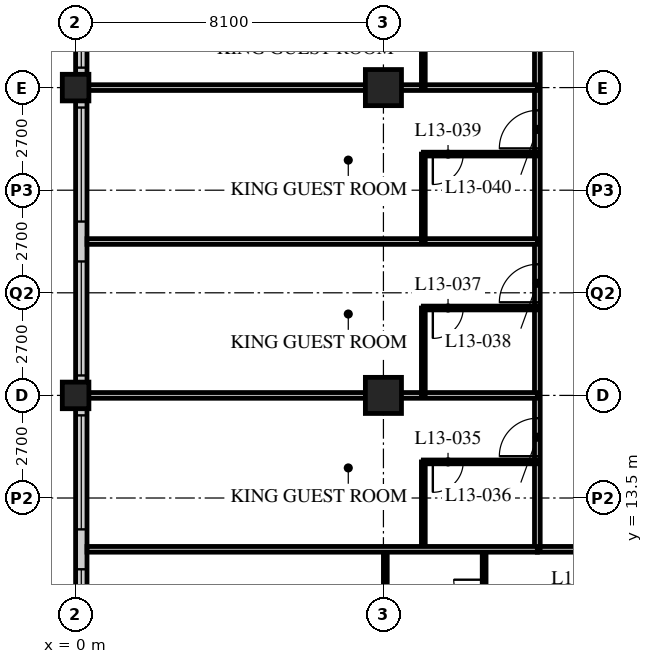
"""IFC4 building model, lengths in metres.
Left out: names, types, materials, properties, quantities, classifications, styles, units other than length and angle.
Written with IfcOpenShell. Run it as: python <this file> out.ifc"""

import sys

from ifc_helpers import new_model, si_unit, direction, frame, frame_2d, origin, origin_2d, place, context, subcontext, project, spatial, rectangle, hollow_rectangle, extrude, element, fill, save


model = new_model("IFC4")
c1 = context("Model", 3, precision=1e-05, world=origin(), true_north=direction((0.0, 1.0)))
c2 = subcontext(c1, "Body", "Model", "MODEL_VIEW")
j1 = project(units=[si_unit("LENGTHUNIT", "METRE"), si_unit("PLANEANGLEUNIT", "RADIAN")], contexts=[c1])
p1 = place(None, origin())
s1 = spatial("IfcSite", under=j1, at=p1, CompositionType="ELEMENT")
p2 = place(p1, origin())
s2 = spatial("IfcBuilding", under=s1, at=p2, CompositionType="ELEMENT")
p3 = place(p2, frame((0.0, 0.0, 56.8)))
s3 = spatial("IfcBuildingStorey", under=s2, at=p3, CompositionType="ELEMENT", Elevation=56.8)
for number, where, z_axis, x_axis in (
    (1, (0.0, 16.2, 0.0), (0.0, 0.0, 1.0), (1.0, 0.0, 0.0)),
    (2, (0.0, 24.3, 0.0), (0.0, 0.0, 1.0), (1.0, 0.0, 0.0)),
):
    element("IfcColumn", number, at=place(p3, frame(where, z_axis=z_axis, x_axis=x_axis)), inside=s3, PredefinedType="COLUMN", context=c2, shape_type="SweptSolid", body=[
        extrude(hollow_rectangle(XDim=0.7, YDim=0.7, WallThickness=0.06, at=origin_2d()), origin(), (0.0, 0.0, 1.0), 3.4),
    ])
for number, where, z_axis, x_axis in (
    (3, (8.1, 16.2, 0.0), (0.0, 0.0, 1.0), (1.0, 0.0, 0.0)),
    (4, (8.1, 24.3, 0.0), (0.0, 0.0, 1.0), (1.0, 0.0, 0.0)),
):
    element("IfcColumn", number, at=place(p3, frame(where, z_axis=z_axis, x_axis=x_axis)), inside=s3, PredefinedType="COLUMN", context=c2, shape_type="SweptSolid", body=[
        extrude(hollow_rectangle(XDim=0.95, YDim=0.95, WallThickness=0.095, at=origin_2d()), origin(), (0.0, 0.0, 1.0), 3.4),
    ])
p4 = place(p3, frame((0.15, 40.2, 0.0), z_axis=(0.0, 0.0, 1.0), x_axis=(0.0, -1.0, 0.0)))
e5 = element("IfcWall", 5, at=p4, inside=s3, PredefinedType="SOLIDWALL", context=c2, shape_type="SweptSolid", body=[
    extrude(rectangle(XDim=32.1, YDim=0.3, at=frame_2d((16.05, 0.0))), origin(), (0.0, 0.0, 1.0), 3.19),
])
p5 = place(p4, frame((0.225, 0.0, 0.9)))
e6 = element("IfcOpeningElement", 6, at=p5, cuts=e5, PredefinedType="OPENING", context=c2, shape_type="SweptSolid", body=[
    extrude(rectangle(XDim=3.0, YDim=2.0, at=frame_2d((1.5, 1.0))), frame((0.0, 0.16, 0.0), z_axis=(0.0, -1.0, 0.0), x_axis=(1.0, 0.0, 0.0)), (0.0, 0.0, 1.0), 0.32),
])
p6 = place(p4, frame((4.275, 0.0, 0.9)))
e7 = element("IfcOpeningElement", 7, at=p6, cuts=e5, PredefinedType="OPENING", context=c2, shape_type="SweptSolid", body=[
    extrude(rectangle(XDim=3.0, YDim=2.0, at=frame_2d((1.5, 1.0))), frame((0.0, 0.16, 0.0), z_axis=(0.0, -1.0, 0.0), x_axis=(1.0, 0.0, 0.0)), (0.0, 0.0, 1.0), 0.32),
])
p7 = place(p4, frame((8.325, 0.0, 0.9)))
e8 = element("IfcOpeningElement", 8, at=p7, cuts=e5, PredefinedType="OPENING", context=c2, shape_type="SweptSolid", body=[
    extrude(rectangle(XDim=3.0, YDim=2.0, at=frame_2d((1.5, 1.0))), frame((0.0, 0.16, 0.0), z_axis=(0.0, -1.0, 0.0), x_axis=(1.0, 0.0, 0.0)), (0.0, 0.0, 1.0), 0.32),
])
p8 = place(p4, frame((12.375, 0.0, 0.9)))
e9 = element("IfcOpeningElement", 9, at=p8, cuts=e5, PredefinedType="OPENING", context=c2, shape_type="SweptSolid", body=[
    extrude(rectangle(XDim=3.0, YDim=2.0, at=frame_2d((1.5, 1.0))), frame((0.0, 0.16, 0.0), z_axis=(0.0, -1.0, 0.0), x_axis=(1.0, 0.0, 0.0)), (0.0, 0.0, 1.0), 0.32),
])
p9 = place(p4, frame((16.425, 0.0, 0.9)))
e10 = element("IfcOpeningElement", 10, at=p9, cuts=e5, PredefinedType="OPENING", context=c2, shape_type="SweptSolid", body=[
    extrude(rectangle(XDim=3.0, YDim=2.0, at=frame_2d((1.5, 1.0))), frame((0.0, 0.16, 0.0), z_axis=(0.0, -1.0, 0.0), x_axis=(1.0, 0.0, 0.0)), (0.0, 0.0, 1.0), 0.32),
])
p10 = place(p4, frame((20.475, 0.0, 0.9)))
e11 = element("IfcOpeningElement", 11, at=p10, cuts=e5, PredefinedType="OPENING", context=c2, shape_type="SweptSolid", body=[
    extrude(rectangle(XDim=3.0, YDim=2.0, at=frame_2d((1.5, 1.0))), frame((0.0, 0.16, 0.0), z_axis=(0.0, -1.0, 0.0), x_axis=(1.0, 0.0, 0.0)), (0.0, 0.0, 1.0), 0.32),
])
p11 = place(p4, frame((24.525, 0.0, 0.9)))
e12 = element("IfcOpeningElement", 12, at=p11, cuts=e5, PredefinedType="OPENING", context=c2, shape_type="SweptSolid", body=[
    extrude(rectangle(XDim=3.0, YDim=2.0, at=frame_2d((1.5, 1.0))), frame((0.0, 0.16, 0.0), z_axis=(0.0, -1.0, 0.0), x_axis=(1.0, 0.0, 0.0)), (0.0, 0.0, 1.0), 0.32),
])
p12 = place(p4, frame((28.575, 0.0, 0.9)))
e13 = element("IfcOpeningElement", 13, at=p12, cuts=e5, PredefinedType="OPENING", context=c2, shape_type="SweptSolid", body=[
    extrude(rectangle(XDim=3.0, YDim=2.0, at=frame_2d((1.5, 1.0))), frame((0.0, 0.16, 0.0), z_axis=(0.0, -1.0, 0.0), x_axis=(1.0, 0.0, 0.0)), (0.0, 0.0, 1.0), 0.32),
])
p13 = place(p3, frame((12.15, 12.15, 0.0), z_axis=(0.0, 0.0, 1.0), x_axis=(1.0, 0.0, 0.0)))
e14 = element("IfcWall", 14, at=p13, inside=s3, PredefinedType="PARTITIONING", context=c2, shape_type="SweptSolid", body=[
    extrude(rectangle(XDim=32.4, YDim=0.15, at=frame_2d((16.2, 0.0))), origin(), (0.0, 0.0, 1.0), 3.19),
])
p14 = place(p13, frame((6.5, 0.0, 0.0)))
e15 = element("IfcOpeningElement", 15, at=p14, cuts=e14, PredefinedType="OPENING", context=c2, shape_type="SweptSolid", body=[
    extrude(rectangle(XDim=1.0, YDim=2.1, at=frame_2d((0.5, 1.05))), frame((0.0, 0.085, 0.0), z_axis=(0.0, -1.0, 0.0), x_axis=(1.0, 0.0, 0.0)), (0.0, 0.0, 1.0), 0.17),
])
p15 = place(p13, frame((8.4, 0.0, 0.0)))
e16 = element("IfcOpeningElement", 16, at=p15, cuts=e14, PredefinedType="OPENING", context=c2, shape_type="SweptSolid", body=[
    extrude(rectangle(XDim=1.0, YDim=2.1, at=frame_2d((0.5, 1.05))), frame((0.0, 0.085, 0.0), z_axis=(0.0, -1.0, 0.0), x_axis=(1.0, 0.0, 0.0)), (0.0, 0.0, 1.0), 0.17),
])
p16 = place(p13, frame((14.6, 0.0, 0.0)))
e17 = element("IfcOpeningElement", 17, at=p16, cuts=e14, PredefinedType="OPENING", context=c2, shape_type="SweptSolid", body=[
    extrude(rectangle(XDim=1.0, YDim=2.1, at=frame_2d((0.5, 1.05))), frame((0.0, 0.085, 0.0), z_axis=(0.0, -1.0, 0.0), x_axis=(1.0, 0.0, 0.0)), (0.0, 0.0, 1.0), 0.17),
])
p17 = place(p13, frame((18.65, 0.0, 0.0)))
e18 = element("IfcOpeningElement", 18, at=p17, cuts=e14, PredefinedType="OPENING", context=c2, shape_type="SweptSolid", body=[
    extrude(rectangle(XDim=1.0, YDim=2.1, at=frame_2d((0.5, 1.05))), frame((0.0, 0.085, 0.0), z_axis=(0.0, -1.0, 0.0), x_axis=(1.0, 0.0, 0.0)), (0.0, 0.0, 1.0), 0.17),
])
p18 = place(p13, frame((20.55, 0.0, 0.0)))
e19 = element("IfcOpeningElement", 19, at=p18, cuts=e14, PredefinedType="OPENING", context=c2, shape_type="SweptSolid", body=[
    extrude(rectangle(XDim=1.0, YDim=2.1, at=frame_2d((0.5, 1.05))), frame((0.0, 0.085, 0.0), z_axis=(0.0, -1.0, 0.0), x_axis=(1.0, 0.0, 0.0)), (0.0, 0.0, 1.0), 0.17),
])
p19 = place(p13, frame((26.75, 0.0, 0.0)))
e20 = element("IfcOpeningElement", 20, at=p19, cuts=e14, PredefinedType="OPENING", context=c2, shape_type="SweptSolid", body=[
    extrude(rectangle(XDim=1.0, YDim=2.1, at=frame_2d((0.5, 1.05))), frame((0.0, 0.085, 0.0), z_axis=(0.0, -1.0, 0.0), x_axis=(1.0, 0.0, 0.0)), (0.0, 0.0, 1.0), 0.17),
])
p20 = place(p13, frame((1.525, 0.0, 0.0)))
e21 = element("IfcOpeningElement", 21, at=p20, cuts=e14, PredefinedType="OPENING", context=c2, shape_type="SweptSolid", body=[
    extrude(rectangle(XDim=1.0, YDim=2.1, at=frame_2d((0.5, 1.05))), frame((0.0, 0.085, 0.0), z_axis=(0.0, -1.0, 0.0), x_axis=(1.0, 0.0, 0.0)), (0.0, 0.0, 1.0), 0.17),
])
p21 = place(p13, frame((29.875, 0.0, 0.0)))
e22 = element("IfcOpeningElement", 22, at=p21, cuts=e14, PredefinedType="OPENING", context=c2, shape_type="SweptSolid", body=[
    extrude(rectangle(XDim=1.0, YDim=2.1, at=frame_2d((0.5, 1.05))), frame((0.0, 0.085, 0.0), z_axis=(0.0, -1.0, 0.0), x_axis=(1.0, 0.0, 0.0)), (0.0, 0.0, 1.0), 0.17),
])
p22 = place(p3, frame((12.15, 12.15, 0.0), z_axis=(0.0, 0.0, 1.0), x_axis=(0.0, 1.0, 0.0)))
e23 = element("IfcWall", 23, at=p22, inside=s3, PredefinedType="PARTITIONING", context=c2, shape_type="SweptSolid", body=[
    extrude(rectangle(XDim=30.15, YDim=0.15, at=frame_2d((15.075, 0.0))), origin(), (0.0, 0.0, 1.0), 3.19),
])
p23 = place(p22, frame((2.45, 0.0, 0.0)))
e24 = element("IfcOpeningElement", 24, at=p23, cuts=e23, PredefinedType="OPENING", context=c2, shape_type="SweptSolid", body=[
    extrude(rectangle(XDim=1.0, YDim=2.1, at=frame_2d((0.5, 1.05))), frame((0.0, 0.085, 0.0), z_axis=(0.0, -1.0, 0.0), x_axis=(1.0, 0.0, 0.0)), (0.0, 0.0, 1.0), 0.17),
])
p24 = place(p22, frame((6.5, 0.0, 0.0)))
e25 = element("IfcOpeningElement", 25, at=p24, cuts=e23, PredefinedType="OPENING", context=c2, shape_type="SweptSolid", body=[
    extrude(rectangle(XDim=1.0, YDim=2.1, at=frame_2d((0.5, 1.05))), frame((0.0, 0.085, 0.0), z_axis=(0.0, -1.0, 0.0), x_axis=(1.0, 0.0, 0.0)), (0.0, 0.0, 1.0), 0.17),
])
p25 = place(p22, frame((10.55, 0.0, 0.0)))
e26 = element("IfcOpeningElement", 26, at=p25, cuts=e23, PredefinedType="OPENING", context=c2, shape_type="SweptSolid", body=[
    extrude(rectangle(XDim=1.0, YDim=2.1, at=frame_2d((0.5, 1.05))), frame((0.0, 0.085, 0.0), z_axis=(0.0, -1.0, 0.0), x_axis=(1.0, 0.0, 0.0)), (0.0, 0.0, 1.0), 0.17),
])
p26 = place(p22, frame((14.6, 0.0, 0.0)))
e27 = element("IfcOpeningElement", 27, at=p26, cuts=e23, PredefinedType="OPENING", context=c2, shape_type="SweptSolid", body=[
    extrude(rectangle(XDim=1.0, YDim=2.1, at=frame_2d((0.5, 1.05))), frame((0.0, 0.085, 0.0), z_axis=(0.0, -1.0, 0.0), x_axis=(1.0, 0.0, 0.0)), (0.0, 0.0, 1.0), 0.17),
])
p27 = place(p22, frame((21.65, 0.0, 0.0)))
e28 = element("IfcOpeningElement", 28, at=p27, cuts=e23, PredefinedType="OPENING", context=c2, shape_type="SweptSolid", body=[
    extrude(rectangle(XDim=1.0, YDim=2.1, at=frame_2d((0.5, 1.05))), frame((0.0, 0.085, 0.0), z_axis=(0.0, -1.0, 0.0), x_axis=(1.0, 0.0, 0.0)), (0.0, 0.0, 1.0), 0.17),
])
p28 = place(p22, frame((26.7, 0.0, 0.0)))
e29 = element("IfcOpeningElement", 29, at=p28, cuts=e23, PredefinedType="OPENING", context=c2, shape_type="SweptSolid", body=[
    extrude(rectangle(XDim=1.0, YDim=2.1, at=frame_2d((0.5, 1.05))), frame((0.0, 0.085, 0.0), z_axis=(0.0, -1.0, 0.0), x_axis=(1.0, 0.0, 0.0)), (0.0, 0.0, 1.0), 0.17),
])
p29 = place(p3, frame((9.15, 12.15, 0.0), z_axis=(0.0, 0.0, 1.0), x_axis=(0.0, 1.0, 0.0)))
e30 = element("IfcWall", 30, at=p29, inside=s3, PredefinedType="PARTITIONING", context=c2, shape_type="SweptSolid", body=[
    extrude(rectangle(XDim=2.3, YDim=0.1, at=frame_2d((1.15, 0.0))), origin(), (0.0, 0.0, 1.0), 3.19),
])
p30 = place(p3, frame((12.15, 14.45, 0.0), z_axis=(0.0, 0.0, 1.0), x_axis=(-1.0, 0.0, 0.0)))
e31 = element("IfcWall", 31, at=p30, inside=s3, PredefinedType="PARTITIONING", context=c2, shape_type="SweptSolid", body=[
    extrude(rectangle(XDim=3.0, YDim=0.1, at=frame_2d((1.5, 0.0))), origin(), (0.0, 0.0, 1.0), 3.19),
])
p31 = place(p30, frame((1.95, 0.0, 0.0)))
e32 = element("IfcOpeningElement", 32, at=p31, cuts=e31, PredefinedType="OPENING", context=c2, shape_type="SweptSolid", body=[
    extrude(rectangle(XDim=0.8, YDim=2.1, at=frame_2d((0.4, 1.05))), frame((0.0, 0.06, 0.0), z_axis=(0.0, -1.0, 0.0), x_axis=(1.0, 0.0, 0.0)), (0.0, 0.0, 1.0), 0.12),
])
p32 = place(p3, frame((12.15, 16.2, 0.0), z_axis=(0.0, 0.0, 1.0), x_axis=(-1.0, 0.0, 0.0)))
e33 = element("IfcWall", 33, at=p32, inside=s3, PredefinedType="PARTITIONING", context=c2, shape_type="SweptSolid", body=[
    extrude(rectangle(XDim=11.85, YDim=0.15, at=frame_2d((5.925, 0.0))), origin(), (0.0, 0.0, 1.0), 2.578),
])
p33 = place(p3, frame((9.15, 16.2, 0.0), z_axis=(0.0, 0.0, 1.0), x_axis=(0.0, 1.0, 0.0)))
e34 = element("IfcWall", 34, at=p33, inside=s3, PredefinedType="PARTITIONING", context=c2, shape_type="SweptSolid", body=[
    extrude(rectangle(XDim=2.3, YDim=0.1, at=frame_2d((1.15, 0.0))), origin(), (0.0, 0.0, 1.0), 3.19),
])
p34 = place(p3, frame((12.15, 18.5, 0.0), z_axis=(0.0, 0.0, 1.0), x_axis=(-1.0, 0.0, 0.0)))
e35 = element("IfcWall", 35, at=p34, inside=s3, PredefinedType="PARTITIONING", context=c2, shape_type="SweptSolid", body=[
    extrude(rectangle(XDim=3.0, YDim=0.1, at=frame_2d((1.5, 0.0))), origin(), (0.0, 0.0, 1.0), 3.19),
])
p35 = place(p34, frame((1.95, 0.0, 0.0)))
e36 = element("IfcOpeningElement", 36, at=p35, cuts=e35, PredefinedType="OPENING", context=c2, shape_type="SweptSolid", body=[
    extrude(rectangle(XDim=0.8, YDim=2.1, at=frame_2d((0.4, 1.05))), frame((0.0, 0.06, 0.0), z_axis=(0.0, -1.0, 0.0), x_axis=(1.0, 0.0, 0.0)), (0.0, 0.0, 1.0), 0.12),
])
p36 = place(p3, frame((12.15, 20.25, 0.0), z_axis=(0.0, 0.0, 1.0), x_axis=(-1.0, 0.0, 0.0)))
e37 = element("IfcWall", 37, at=p36, inside=s3, PredefinedType="PARTITIONING", context=c2, shape_type="SweptSolid", body=[
    extrude(rectangle(XDim=11.85, YDim=0.15, at=frame_2d((5.925, 0.0))), origin(), (0.0, 0.0, 1.0), 3.19),
])
p37 = place(p3, frame((9.15, 20.25, 0.0), z_axis=(0.0, 0.0, 1.0), x_axis=(0.0, 1.0, 0.0)))
e38 = element("IfcWall", 38, at=p37, inside=s3, PredefinedType="PARTITIONING", context=c2, shape_type="SweptSolid", body=[
    extrude(rectangle(XDim=2.3, YDim=0.1, at=frame_2d((1.15, 0.0))), origin(), (0.0, 0.0, 1.0), 3.19),
])
p38 = place(p3, frame((12.15, 22.55, 0.0), z_axis=(0.0, 0.0, 1.0), x_axis=(-1.0, 0.0, 0.0)))
e39 = element("IfcWall", 39, at=p38, inside=s3, PredefinedType="PARTITIONING", context=c2, shape_type="SweptSolid", body=[
    extrude(rectangle(XDim=3.0, YDim=0.1, at=frame_2d((1.5, 0.0))), origin(), (0.0, 0.0, 1.0), 3.19),
])
p39 = place(p38, frame((1.95, 0.0, 0.0)))
e40 = element("IfcOpeningElement", 40, at=p39, cuts=e39, PredefinedType="OPENING", context=c2, shape_type="SweptSolid", body=[
    extrude(rectangle(XDim=0.8, YDim=2.1, at=frame_2d((0.4, 1.05))), frame((0.0, 0.06, 0.0), z_axis=(0.0, -1.0, 0.0), x_axis=(1.0, 0.0, 0.0)), (0.0, 0.0, 1.0), 0.12),
])
p40 = place(p3, frame((12.15, 24.3, 0.0), z_axis=(0.0, 0.0, 1.0), x_axis=(-1.0, 0.0, 0.0)))
e41 = element("IfcWall", 41, at=p40, inside=s3, PredefinedType="PARTITIONING", context=c2, shape_type="SweptSolid", body=[
    extrude(rectangle(XDim=11.85, YDim=0.15, at=frame_2d((5.925, 0.0))), origin(), (0.0, 0.0, 1.0), 2.578),
])
p41 = place(p3, frame((9.15, 24.3, 0.0), z_axis=(0.0, 0.0, 1.0), x_axis=(0.0, 1.0, 0.0)))
e42 = element("IfcWall", 42, at=p41, inside=s3, PredefinedType="PARTITIONING", context=c2, shape_type="SweptSolid", body=[
    extrude(rectangle(XDim=2.3, YDim=0.1, at=frame_2d((1.15, 0.0))), origin(), (0.0, 0.0, 1.0), 3.19),
])
p42 = place(p3, frame((10.75, 12.15, 0.0), z_axis=(0.0, 0.0, 1.0), x_axis=(0.0, -1.0, 0.0)))
e43 = element("IfcWall", 43, at=p42, inside=s3, PredefinedType="PARTITIONING", context=c2, shape_type="SweptSolid", body=[
    extrude(rectangle(XDim=2.4, YDim=0.1, at=frame_2d((1.2, 0.0))), origin(), (0.0, 0.0, 1.0), 3.19),
])
p43 = place(p42, frame((0.8, 0.0, 0.0)))
e44 = element("IfcOpeningElement", 44, at=p43, cuts=e43, PredefinedType="OPENING", context=c2, shape_type="SweptSolid", body=[
    extrude(rectangle(XDim=0.8, YDim=2.1, at=frame_2d((0.4, 1.05))), frame((0.0, 0.06, 0.0), z_axis=(0.0, -1.0, 0.0), x_axis=(1.0, 0.0, 0.0)), (0.0, 0.0, 1.0), 0.12),
])
p44 = place(p3, frame((8.15, 12.15, 0.0), z_axis=(0.0, 0.0, 1.0), x_axis=(0.0, -1.0, 0.0)))
e45 = element("IfcWall", 45, at=p44, inside=s3, PredefinedType="PARTITIONING", context=c2, shape_type="SweptSolid", body=[
    extrude(rectangle(XDim=2.4, YDim=0.1, at=frame_2d((1.2, 0.0))), origin(), (0.0, 0.0, 1.0), 2.578),
])
p45 = place(p3, frame((0.3, 12.15, 0.0), z_axis=(0.0, 0.0, 1.0), x_axis=(1.0, 0.0, 0.0)))
e46 = element("IfcWall", 46, at=p45, inside=s3, PredefinedType="PARTITIONING", context=c2, shape_type="SweptSolid", body=[
    extrude(rectangle(XDim=11.85, YDim=0.15, at=frame_2d((5.925, 0.0))), origin(), (0.0, 0.0, 1.0), 3.19),
])
p46 = place(p8, origin())
e47 = element("IfcWindow", 47, at=p46, inside=s3, PartitioningType="SINGLE_PANEL", PredefinedType="WINDOW", context=c2, shape_type="SweptSolid", body=[
    extrude(rectangle(XDim=3.0, YDim=2.0, at=frame_2d((1.5, 1.0))), frame((0.0, 0.03, 0.0), z_axis=(0.0, -1.0, 0.0), x_axis=(1.0, 0.0, 0.0)), (0.0, 0.0, 1.0), 0.06),
])
fill(e9, e47)
p47 = place(p9, origin())
e48 = element("IfcWindow", 48, at=p47, inside=s3, PartitioningType="SINGLE_PANEL", PredefinedType="WINDOW", context=c2, shape_type="SweptSolid", body=[
    extrude(rectangle(XDim=3.0, YDim=2.0, at=frame_2d((1.5, 1.0))), frame((0.0, 0.03, 0.0), z_axis=(0.0, -1.0, 0.0), x_axis=(1.0, 0.0, 0.0)), (0.0, 0.0, 1.0), 0.06),
])
fill(e10, e48)
p48 = place(p10, origin())
e49 = element("IfcWindow", 49, at=p48, inside=s3, PartitioningType="SINGLE_PANEL", PredefinedType="WINDOW", context=c2, shape_type="SweptSolid", body=[
    extrude(rectangle(XDim=3.0, YDim=2.0, at=frame_2d((1.5, 1.0))), frame((0.0, 0.03, 0.0), z_axis=(0.0, -1.0, 0.0), x_axis=(1.0, 0.0, 0.0)), (0.0, 0.0, 1.0), 0.06),
])
fill(e11, e49)
p49 = place(p11, origin())
e50 = element("IfcWindow", 50, at=p49, inside=s3, PartitioningType="SINGLE_PANEL", PredefinedType="WINDOW", context=c2, shape_type="SweptSolid", body=[
    extrude(rectangle(XDim=3.0, YDim=2.0, at=frame_2d((1.5, 1.0))), frame((0.0, 0.03, 0.0), z_axis=(0.0, -1.0, 0.0), x_axis=(1.0, 0.0, 0.0)), (0.0, 0.0, 1.0), 0.06),
])
fill(e12, e50)
p50 = place(p12, origin())
e51 = element("IfcWindow", 51, at=p50, inside=s3, PartitioningType="SINGLE_PANEL", PredefinedType="WINDOW", context=c2, shape_type="SweptSolid", body=[
    extrude(rectangle(XDim=3.0, YDim=2.0, at=frame_2d((1.5, 1.0))), frame((0.0, 0.03, 0.0), z_axis=(0.0, -1.0, 0.0), x_axis=(1.0, 0.0, 0.0)), (0.0, 0.0, 1.0), 0.06),
])
fill(e13, e51)
p51 = place(p31, origin())
e52 = element("IfcDoor", 52, at=p51, inside=s3, OperationType="SINGLE_SWING_RIGHT", PredefinedType="DOOR", context=c2, shape_type="SweptSolid", body=[
    extrude(rectangle(XDim=0.8, YDim=2.1, at=frame_2d((0.4, 1.05))), frame((0.0, 0.025, 0.0), z_axis=(0.0, -1.0, 0.0), x_axis=(1.0, 0.0, 0.0)), (0.0, 0.0, 1.0), 0.05),
])
fill(e32, e52)
p52 = place(p23, origin())
e53 = element("IfcDoor", 53, at=p52, inside=s3, OperationType="SINGLE_SWING_LEFT", PredefinedType="DOOR", context=c2, shape_type="SweptSolid", body=[
    extrude(rectangle(XDim=1.0, YDim=2.1, at=frame_2d((0.5, 1.05))), frame((0.0, 0.025, 0.0), z_axis=(0.0, -1.0, 0.0), x_axis=(1.0, 0.0, 0.0)), (0.0, 0.0, 1.0), 0.05),
])
fill(e24, e53)
p53 = place(p35, origin())
e54 = element("IfcDoor", 54, at=p53, inside=s3, OperationType="SINGLE_SWING_RIGHT", PredefinedType="DOOR", context=c2, shape_type="SweptSolid", body=[
    extrude(rectangle(XDim=0.8, YDim=2.1, at=frame_2d((0.4, 1.05))), frame((0.0, 0.025, 0.0), z_axis=(0.0, -1.0, 0.0), x_axis=(1.0, 0.0, 0.0)), (0.0, 0.0, 1.0), 0.05),
])
fill(e36, e54)
p54 = place(p24, origin())
e55 = element("IfcDoor", 55, at=p54, inside=s3, OperationType="SINGLE_SWING_LEFT", PredefinedType="DOOR", context=c2, shape_type="SweptSolid", body=[
    extrude(rectangle(XDim=1.0, YDim=2.1, at=frame_2d((0.5, 1.05))), frame((0.0, 0.025, 0.0), z_axis=(0.0, -1.0, 0.0), x_axis=(1.0, 0.0, 0.0)), (0.0, 0.0, 1.0), 0.05),
])
fill(e25, e55)
p55 = place(p39, origin())
e56 = element("IfcDoor", 56, at=p55, inside=s3, OperationType="SINGLE_SWING_RIGHT", PredefinedType="DOOR", context=c2, shape_type="SweptSolid", body=[
    extrude(rectangle(XDim=0.8, YDim=2.1, at=frame_2d((0.4, 1.05))), frame((0.0, 0.025, 0.0), z_axis=(0.0, -1.0, 0.0), x_axis=(1.0, 0.0, 0.0)), (0.0, 0.0, 1.0), 0.05),
])
fill(e40, e56)
p56 = place(p25, origin())
e57 = element("IfcDoor", 57, at=p56, inside=s3, OperationType="SINGLE_SWING_LEFT", PredefinedType="DOOR", context=c2, shape_type="SweptSolid", body=[
    extrude(rectangle(XDim=1.0, YDim=2.1, at=frame_2d((0.5, 1.05))), frame((0.0, 0.025, 0.0), z_axis=(0.0, -1.0, 0.0), x_axis=(1.0, 0.0, 0.0)), (0.0, 0.0, 1.0), 0.05),
])
fill(e26, e57)
p57 = place(p43, origin())
e58 = element("IfcDoor", 58, at=p57, inside=s3, OperationType="SINGLE_SWING_RIGHT", PredefinedType="DOOR", context=c2, shape_type="SweptSolid", body=[
    extrude(rectangle(XDim=0.8, YDim=2.1, at=frame_2d((0.4, 1.05))), frame((0.0, 0.025, 0.0), z_axis=(0.0, -1.0, 0.0), x_axis=(1.0, 0.0, 0.0)), (0.0, 0.0, 1.0), 0.05),
])
fill(e44, e58)
save(model, sys.argv[1])
